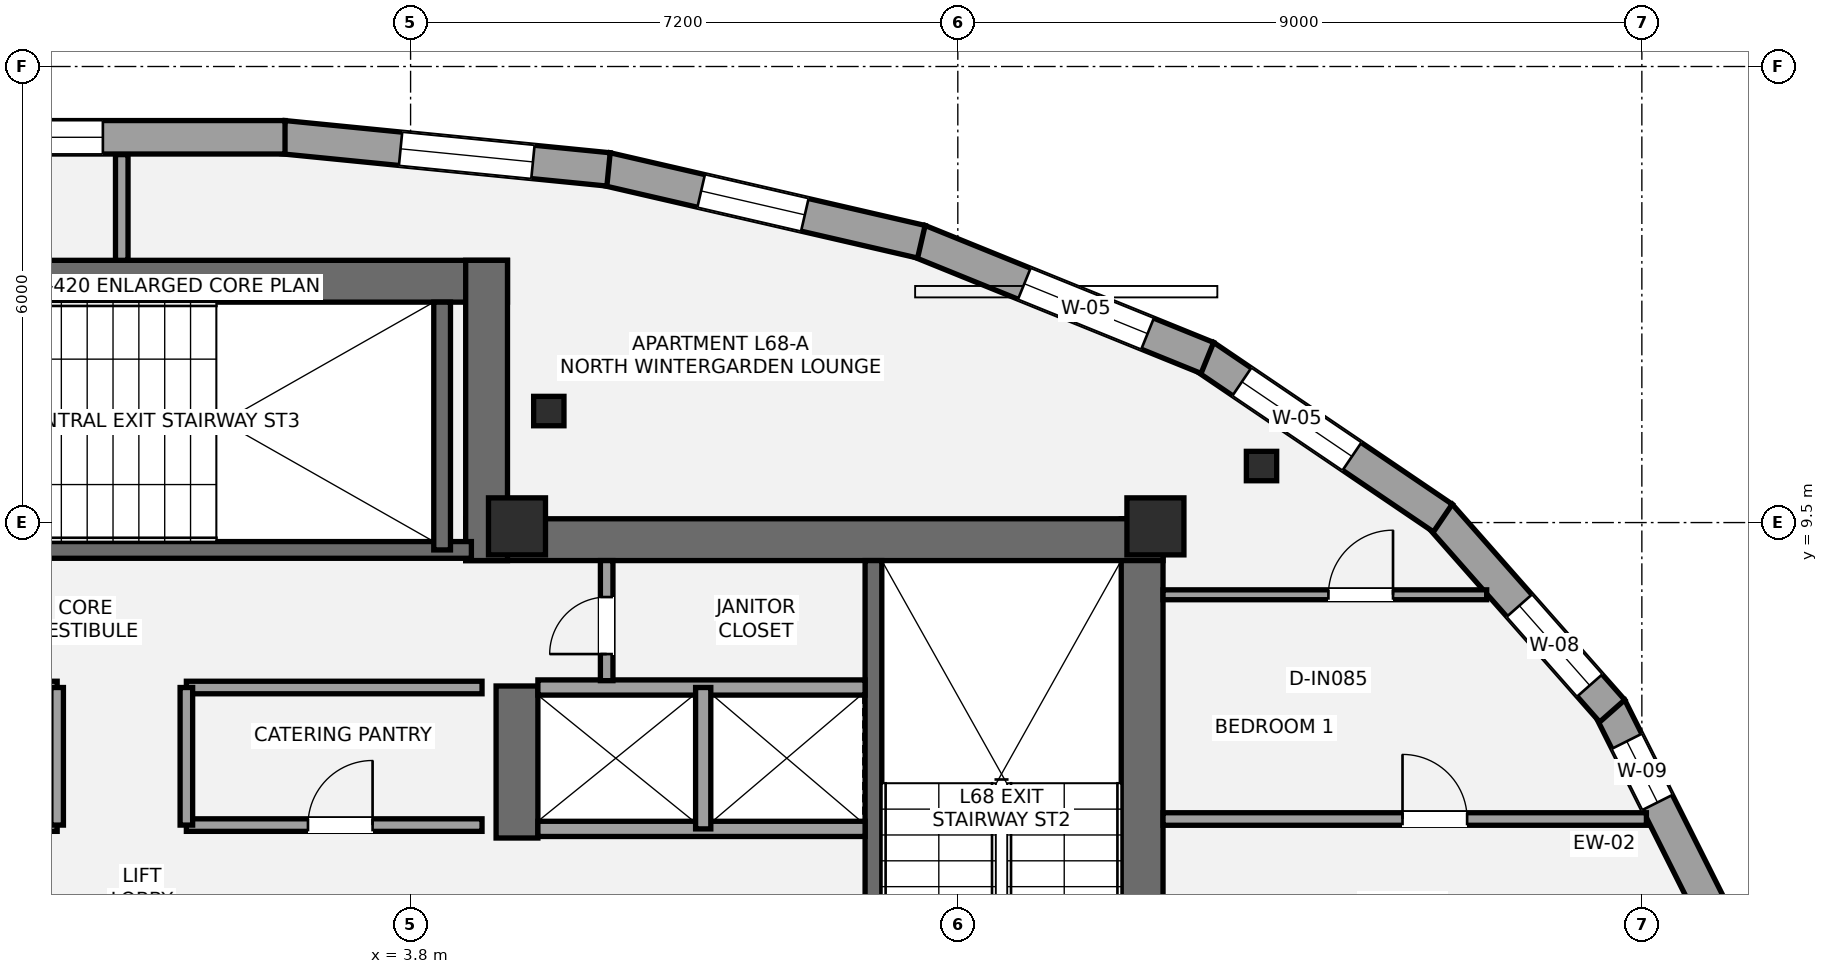
"""IFC4 building model, lengths in metres.
Left out: names, types, materials, properties, quantities, classifications, styles, units other than length and angle.
Written with IfcOpenShell. Run it as: python <this file> out.ifc"""

import sys

from ifc_helpers import new_model, si_unit, direction, frame, frame_2d, origin, origin_2d, place, context, subcontext, project, spatial, rectangle, i_section, extrude, element, fill, save


model = new_model("IFC4")
c1 = context("Model", 3, precision=1e-05, world=origin(), true_north=direction((0.0, 1.0)))
c2 = subcontext(c1, "Body", "Model", "MODEL_VIEW")
j1 = project(units=[si_unit("LENGTHUNIT", "METRE"), si_unit("PLANEANGLEUNIT", "RADIAN")], contexts=[c1])
p1 = place(None, origin())
s1 = spatial("IfcSite", under=j1, at=p1, CompositionType="ELEMENT")
p2 = place(p1, origin())
s2 = spatial("IfcBuilding", under=s1, at=p2, CompositionType="ELEMENT")
p3 = place(p2, frame((0.0, 0.0, 241.5)))
s3 = spatial("IfcBuildingStorey", under=s2, at=p3, CompositionType="ELEMENT", Elevation=241.5)
p4 = place(p3, frame((13.425, 1.3, 0.0), z_axis=(0.0, 0.0, 1.0), x_axis=(0.0, 1.0, 0.0)))
e1 = element("IfcWall", 1, at=p4, inside=s3, PredefinedType="SHEAR", context=c2, shape_type="SweptSolid", body=[
    extrude(rectangle(XDim=8.25, YDim=0.55, at=frame_2d((4.125, 0.0))), origin(), (0.0, 0.0, 1.0), 3.15),
])
p5 = place(p3, frame((4.525, 9.275, 0.0), z_axis=(0.0, 0.0, 1.0), x_axis=(1.0, 0.0, 0.0)))
e2 = element("IfcWall", 2, at=p5, inside=s3, PredefinedType="SHEAR", context=c2, shape_type="SweptSolid", body=[
    extrude(rectangle(XDim=9.175, YDim=0.55, at=frame_2d((4.587, 0.0))), origin(), (0.0, 0.0, 1.0), 3.15),
])
p6 = place(p3, frame((5.2, 5.35, 0.0), z_axis=(0.0, 0.0, 1.0), x_axis=(0.0, 1.0, 0.0)))
e3 = element("IfcWall", 3, at=p6, inside=s3, PredefinedType="SHEAR", context=c2, shape_type="SweptSolid", body=[
    extrude(rectangle(XDim=2.0, YDim=0.55, at=frame_2d((1.0, 0.0))), origin(), (0.0, 0.0, 1.0), 3.15),
])
p7 = place(p3, frame((9.89, 1.85, 0.0), z_axis=(0.0, 0.0, 1.0), x_axis=(0.0, 1.0, 0.0)))
e4 = element("IfcWall", 4, at=p7, inside=s3, PredefinedType="SHEAR", context=c2, shape_type="SweptSolid", body=[
    extrude(rectangle(XDim=7.15, YDim=0.22, at=frame_2d((3.575, 0.0))), origin(), (0.0, 0.0, 1.0), 3.15),
])
p8 = place(p3, frame((-5.075, 12.675, 0.0), z_axis=(0.0, 0.0, 1.0), x_axis=(1.0, 0.0, 0.0)))
e5 = element("IfcWall", 5, at=p8, inside=s3, PredefinedType="SHEAR", context=c2, shape_type="SweptSolid", body=[
    extrude(rectangle(XDim=10.15, YDim=0.55, at=frame_2d((5.075, 0.0))), origin(), (0.0, 0.0, 1.0), 3.15),
])
p9 = place(p3, frame((4.8, 9.0, 0.0), z_axis=(0.0, 0.0, 1.0), x_axis=(0.0, 1.0, 0.0)))
e6 = element("IfcWall", 6, at=p9, inside=s3, PredefinedType="SHEAR", context=c2, shape_type="SweptSolid", body=[
    extrude(rectangle(XDim=3.95, YDim=0.55, at=frame_2d((1.975, 0.0))), origin(), (0.0, 0.0, 1.0), 3.15),
])
p10 = place(p3, frame((-4.7, 9.14, 0.0), z_axis=(0.0, 0.0, 1.0), x_axis=(1.0, 0.0, 0.0)))
e7 = element("IfcWall", 7, at=p10, inside=s3, PredefinedType="SHEAR", context=c2, shape_type="SweptSolid", body=[
    extrude(rectangle(XDim=9.3, YDim=0.22, at=frame_2d((4.65, 0.0))), origin(), (0.0, 0.0, 1.0), 3.15),
])
p11 = place(p10, frame((1.15, 0.0, 0.0)))
e8 = element("IfcOpeningElement", 8, at=p11, cuts=e7, PredefinedType="OPENING", context=c2, shape_type="SweptSolid", body=[
    extrude(rectangle(XDim=1.05, YDim=2.15, at=frame_2d((0.525, 1.075))), frame((0.0, 0.12, 0.0), z_axis=(0.0, -1.0, 0.0), x_axis=(1.0, 0.0, 0.0)), (0.0, 0.0, 1.0), 0.24),
])
p12 = place(p3, frame((4.215, 9.14, 0.0), z_axis=(0.0, 0.0, 1.0), x_axis=(0.0, 1.0, 0.0)))
e9 = element("IfcWall", 9, at=p12, inside=s3, PredefinedType="SHEAR", context=c2, shape_type="SweptSolid", body=[
    extrude(rectangle(XDim=3.26, YDim=0.22, at=frame_2d((1.63, 0.0))), origin(), (0.0, 0.0, 1.0), 3.15),
])
for number, where, z_axis, x_axis in (
    (10, (5.2, 9.45, 0.0), (0.0, 0.0, 1.0), (1.0, 0.0, 0.0)),
    (11, (13.6, 9.45, 0.0), (0.0, 0.0, 1.0), (1.0, 0.0, 0.0)),
):
    element("IfcColumn", number, at=place(p3, frame(where, z_axis=z_axis, x_axis=x_axis)), inside=s3, PredefinedType="PILASTER", context=c2, shape_type="SweptSolid", body=[
        extrude(rectangle(XDim=0.75, YDim=0.75, at=origin_2d()), origin(), (0.0, 0.0, 1.0), 3.15),
    ])
for number, where, z_axis, x_axis in (
    (12, (14.996, 10.244, 0.0), (0.0, 0.0, 1.0), (1.0, 0.0, 0.0)),
    (13, (5.619, 10.967, 0.0), (0.0, 0.0, 1.0), (1.0, 0.0, 0.0)),
):
    element("IfcColumn", number, at=place(p3, frame(where, z_axis=z_axis, x_axis=x_axis)), inside=s3, PredefinedType="COLUMN", context=c2, shape_type="SweptSolid", body=[
        extrude(i_section(OverallWidth=0.399, OverallDepth=0.387, WebThickness=0.021, FlangeThickness=0.033, at=origin_2d()), origin(), (0.0, 0.0, 1.0), 3.15),
    ])
p13 = place(p3, frame((19.578, 7.069, 0.0), z_axis=(0.0, 0.0, 1.0), x_axis=(0.448424724145, -0.893820601002, 0.0)))
e14 = element("IfcWall", 14, at=p13, inside=s3, PredefinedType="STANDARD", context=c2, shape_type="SweptSolid", body=[
    extrude(rectangle(XDim=3.144, YDim=0.44, at=frame_2d((1.572, 0.0))), origin(), (0.0, 0.0, 1.0), 2.336),
])
p14 = place(p13, frame((0.499, 0.0, 0.58)))
e15 = element("IfcOpeningElement", 15, at=p14, cuts=e14, PredefinedType="OPENING", context=c2, shape_type="SweptSolid", body=[
    extrude(rectangle(XDim=0.9, YDim=1.35, at=frame_2d((0.45, 0.675))), frame((0.0, 0.23, 0.0), z_axis=(0.0, -1.0, 0.0), x_axis=(1.0, 0.0, 0.0)), (0.0, 0.0, 1.0), 0.46),
])
p15 = place(p3, frame((17.34, 9.596, 0.0), z_axis=(0.0, 0.0, 1.0), x_axis=(0.66136043846, -0.750068243855, 0.0)))
e16 = element("IfcWall", 16, at=p15, inside=s3, PredefinedType="STANDARD", context=c2, shape_type="SweptSolid", body=[
    extrude(rectangle(XDim=3.432, YDim=0.44, at=frame_2d((1.716, 0.0))), origin(), (0.0, 0.0, 1.0), 2.336),
])
p16 = place(p15, frame((1.585, 0.0, 0.58)))
e17 = element("IfcOpeningElement", 17, at=p16, cuts=e16, PredefinedType="OPENING", context=c2, shape_type="SweptSolid", body=[
    extrude(rectangle(XDim=1.4, YDim=1.55, at=frame_2d((0.7, 0.775))), frame((0.0, 0.23, 0.0), z_axis=(0.0, -1.0, 0.0), x_axis=(1.0, 0.0, 0.0)), (0.0, 0.0, 1.0), 0.46),
])
p17 = place(p3, frame((14.242, 11.688, 0.0), z_axis=(0.0, 0.0, 1.0), x_axis=(0.827637036896, -0.561263694851, 0.0)))
e18 = element("IfcWall", 18, at=p17, inside=s3, PredefinedType="STANDARD", context=c2, shape_type="SweptSolid", body=[
    extrude(rectangle(XDim=3.793, YDim=0.44, at=frame_2d((1.896, 0.0))), origin(), (0.0, 0.0, 1.0), 2.336),
])
p18 = place(p17, frame((0.598, 0.0, 0.55)))
e19 = element("IfcOpeningElement", 19, at=p18, cuts=e18, PredefinedType="OPENING", context=c2, shape_type="SweptSolid", body=[
    extrude(rectangle(XDim=1.75, YDim=1.55, at=frame_2d((0.875, 0.775))), frame((0.0, 0.23, 0.0), z_axis=(0.0, -1.0, 0.0), x_axis=(1.0, 0.0, 0.0)), (0.0, 0.0, 1.0), 0.46),
])
p19 = place(p3, frame((10.487, 13.205, 0.0), z_axis=(0.0, 0.0, 1.0), x_axis=(0.926731976866, -0.375723093586, 0.0)))
e20 = element("IfcWall", 20, at=p19, inside=s3, PredefinedType="STANDARD", context=c2, shape_type="SweptSolid", body=[
    extrude(rectangle(XDim=4.096, YDim=0.44, at=frame_2d((2.048, 0.0))), origin(), (0.0, 0.0, 1.0), 2.336),
])
p20 = place(p19, frame((1.498, 0.0, 0.55)))
e21 = element("IfcOpeningElement", 21, at=p20, cuts=e20, PredefinedType="OPENING", context=c2, shape_type="SweptSolid", body=[
    extrude(rectangle(XDim=1.75, YDim=1.55, at=frame_2d((0.875, 0.775))), frame((0.0, 0.23, 0.0), z_axis=(0.0, -1.0, 0.0), x_axis=(1.0, 0.0, 0.0)), (0.0, 0.0, 1.0), 0.46),
])
p21 = place(p3, frame((6.377, 14.151, 0.0), z_axis=(0.0, 0.0, 1.0), x_axis=(0.974398936081, -0.224825962391, 0.0)))
e22 = element("IfcWall", 22, at=p21, inside=s3, PredefinedType="STANDARD", context=c2, shape_type="SweptSolid", body=[
    extrude(rectangle(XDim=4.252, YDim=0.44, at=frame_2d((2.126, 0.0))), origin(), (0.0, 0.0, 1.0), 2.336),
])
p22 = place(p21, frame((1.279, 0.0, 0.55)))
e23 = element("IfcOpeningElement", 23, at=p22, cuts=e22, PredefinedType="OPENING", context=c2, shape_type="SweptSolid", body=[
    extrude(rectangle(XDim=1.4, YDim=1.55, at=frame_2d((0.7, 0.775))), frame((0.0, 0.23, 0.0), z_axis=(0.0, -1.0, 0.0), x_axis=(1.0, 0.0, 0.0)), (0.0, 0.0, 1.0), 0.46),
])
p23 = place(p3, frame((2.126, 14.57, 0.0), z_axis=(0.0, 0.0, 1.0), x_axis=(0.995134540264, -0.098525361068, 0.0)))
e24 = element("IfcWall", 24, at=p23, inside=s3, PredefinedType="STANDARD", context=c2, shape_type="SweptSolid", body=[
    extrude(rectangle(XDim=4.299, YDim=0.44, at=frame_2d((2.15, 0.0))), origin(), (0.0, 0.0, 1.0), 2.336),
])
p24 = place(p23, frame((1.55, 0.0, 0.55)))
e25 = element("IfcOpeningElement", 25, at=p24, cuts=e24, PredefinedType="OPENING", context=c2, shape_type="SweptSolid", body=[
    extrude(rectangle(XDim=1.75, YDim=1.55, at=frame_2d((0.875, 0.775))), frame((0.0, 0.23, 0.0), z_axis=(0.0, -1.0, 0.0), x_axis=(1.0, 0.0, 0.0)), (0.0, 0.0, 1.0), 0.46),
])
p25 = place(p3, frame((-2.148, 14.569, 0.0), z_axis=(0.0, 0.0, 1.0), x_axis=(1.0, 0.0, 0.0)))
e26 = element("IfcWall", 26, at=p25, inside=s3, PredefinedType="STANDARD", context=c2, shape_type="SweptSolid", body=[
    extrude(rectangle(XDim=4.296, YDim=0.44, at=frame_2d((2.148, 0.0))), origin(), (0.0, 0.0, 1.0), 2.336),
])
p26 = place(p25, frame((0.5, 0.0, 0.58)))
e27 = element("IfcOpeningElement", 27, at=p26, cuts=e26, PredefinedType="OPENING", context=c2, shape_type="SweptSolid", body=[
    extrude(rectangle(XDim=1.4, YDim=1.55, at=frame_2d((0.7, 0.775))), frame((0.0, 0.23, 0.0), z_axis=(0.0, -1.0, 0.0), x_axis=(1.0, 0.0, 0.0)), (0.0, 0.0, 1.0), 0.46),
])
for number, where, z_axis, x_axis in (
    (28, (5.475, 5.47, 0.0), (0.0, 0.0, 1.0), (1.0, 0.0, 0.0)),
    (29, (5.475, 7.33, 0.0), (0.0, 0.0, 1.0), (1.0, 0.0, 0.0)),
):
    element("IfcWall", number, at=place(p3, frame(where, z_axis=z_axis, x_axis=x_axis)), inside=s3, PredefinedType="SOLIDWALL", context=c2, shape_type="SweptSolid", body=[
        extrude(rectangle(XDim=4.305, YDim=0.2, at=frame_2d((2.152, 0.0))), origin(), (0.0, 0.0, 1.0), 2.97),
    ])
p27 = place(p3, frame((7.65, 5.47, 0.0), z_axis=(0.0, 0.0, 1.0), x_axis=(0.0, 1.0, 0.0)))
e30 = element("IfcWall", 30, at=p27, inside=s3, PredefinedType="SOLIDWALL", context=c2, shape_type="SweptSolid", body=[
    extrude(rectangle(XDim=1.86, YDim=0.2, at=frame_2d((0.93, 0.0))), origin(), (0.0, 0.0, 1.0), 2.97),
])
p28 = place(p3, frame((-4.74, 5.52, 0.0), z_axis=(0.0, 0.0, 1.0), x_axis=(1.0, 0.0, 0.0)))
e31 = element("IfcWall", 31, at=p28, inside=s3, PredefinedType="PARTITIONING", context=c2, shape_type="SweptSolid", body=[
    extrude(rectangle(XDim=3.89, YDim=0.165, at=frame_2d((1.945, 0.0))), origin(), (0.0, 0.0, 1.0), 2.97),
])
p29 = place(p28, frame((0.75, 0.0, 0.0)))
e32 = element("IfcOpeningElement", 32, at=p29, cuts=e31, PredefinedType="OPENING", context=c2, shape_type="SweptSolid", body=[
    extrude(rectangle(XDim=0.85, YDim=2.1, at=frame_2d((0.425, 1.05))), frame((0.0, 0.093, 0.0), z_axis=(0.0, -1.0, 0.0), x_axis=(1.0, 0.0, 0.0)), (0.0, 0.0, 1.0), 0.185),
])
p30 = place(p28, frame((2.84, 0.0, 0.0)))
e33 = element("IfcOpeningElement", 33, at=p30, cuts=e31, PredefinedType="OPENING", context=c2, shape_type="SweptSolid", body=[
    extrude(rectangle(XDim=0.75, YDim=2.1, at=frame_2d((0.375, 1.05))), frame((0.0, 0.093, 0.0), z_axis=(0.0, -1.0, 0.0), x_axis=(1.0, 0.0, 0.0)), (0.0, 0.0, 1.0), 0.185),
])
p31 = place(p3, frame((-4.74, 7.33, 0.0), z_axis=(0.0, 0.0, 1.0), x_axis=(1.0, 0.0, 0.0)))
e34 = element("IfcWall", 34, at=p31, inside=s3, PredefinedType="PARTITIONING", context=c2, shape_type="SweptSolid", body=[
    extrude(rectangle(XDim=3.89, YDim=0.165, at=frame_2d((1.945, 0.0))), origin(), (0.0, 0.0, 1.0), 2.97),
])
p32 = place(p3, frame((-0.85, 5.52, 0.0), z_axis=(0.0, 0.0, 1.0), x_axis=(0.0, 1.0, 0.0)))
e35 = element("IfcWall", 35, at=p32, inside=s3, PredefinedType="PARTITIONING", context=c2, shape_type="SweptSolid", body=[
    extrude(rectangle(XDim=1.81, YDim=0.165, at=frame_2d((0.905, 0.0))), origin(), (0.0, 0.0, 1.0), 2.97),
])
p33 = place(p3, frame((0.85, 5.52, 0.0), z_axis=(0.0, 0.0, 1.0), x_axis=(1.0, 0.0, 0.0)))
e36 = element("IfcWall", 36, at=p33, inside=s3, PredefinedType="PARTITIONING", context=c2, shape_type="SweptSolid", body=[
    extrude(rectangle(XDim=3.89, YDim=0.165, at=frame_2d((1.945, 0.0))), origin(), (0.0, 0.0, 1.0), 2.97),
])
p34 = place(p33, frame((1.6, 0.0, 0.0)))
e37 = element("IfcOpeningElement", 37, at=p34, cuts=e36, PredefinedType="OPENING", context=c2, shape_type="SweptSolid", body=[
    extrude(rectangle(XDim=0.85, YDim=2.1, at=frame_2d((0.425, 1.05))), frame((0.0, 0.093, 0.0), z_axis=(0.0, -1.0, 0.0), x_axis=(1.0, 0.0, 0.0)), (0.0, 0.0, 1.0), 0.185),
])
p35 = place(p3, frame((0.85, 7.33, 0.0), z_axis=(0.0, 0.0, 1.0), x_axis=(1.0, 0.0, 0.0)))
e38 = element("IfcWall", 38, at=p35, inside=s3, PredefinedType="PARTITIONING", context=c2, shape_type="SweptSolid", body=[
    extrude(rectangle(XDim=3.89, YDim=0.165, at=frame_2d((1.945, 0.0))), origin(), (0.0, 0.0, 1.0), 2.97),
])
p36 = place(p3, frame((0.85, 5.52, 0.0), z_axis=(0.0, 0.0, 1.0), x_axis=(0.0, 1.0, 0.0)))
e39 = element("IfcWall", 39, at=p36, inside=s3, PredefinedType="PARTITIONING", context=c2, shape_type="SweptSolid", body=[
    extrude(rectangle(XDim=1.81, YDim=0.165, at=frame_2d((0.905, 0.0))), origin(), (0.0, 0.0, 1.0), 2.97),
])
p37 = place(p3, frame((6.38, 7.42, 0.0), z_axis=(0.0, 0.0, 1.0), x_axis=(0.0, 1.0, 0.0)))
e40 = element("IfcWall", 40, at=p37, inside=s3, PredefinedType="PARTITIONING", context=c2, shape_type="SweptSolid", body=[
    extrude(rectangle(XDim=1.58, YDim=0.165, at=frame_2d((0.79, 0.0))), origin(), (0.0, 0.0, 1.0), 2.97),
])
p38 = place(p37, frame((0.35, 0.0, 0.0)))
e41 = element("IfcOpeningElement", 41, at=p38, cuts=e40, PredefinedType="OPENING", context=c2, shape_type="SweptSolid", body=[
    extrude(rectangle(XDim=0.75, YDim=2.1, at=frame_2d((0.375, 1.05))), frame((0.0, 0.093, 0.0), z_axis=(0.0, -1.0, 0.0), x_axis=(1.0, 0.0, 0.0)), (0.0, 0.0, 1.0), 0.185),
])
p39 = place(p3, frame((0.0, 12.95, 0.0), z_axis=(0.0, 0.0, 1.0), x_axis=(0.0, 1.0, 0.0)))
e42 = element("IfcWall", 42, at=p39, inside=s3, PredefinedType="PARTITIONING", context=c2, shape_type="SweptSolid", body=[
    extrude(rectangle(XDim=1.391, YDim=0.165, at=frame_2d((0.695, 0.0))), origin(), (0.0, 0.0, 1.0), 2.97),
])
p40 = place(p3, frame((13.7, 5.6, 0.0), z_axis=(0.0, 0.0, 1.0), x_axis=(1.0, 0.0, 0.0)))
e43 = element("IfcWall", 43, at=p40, inside=s3, PredefinedType="PARTITIONING", context=c2, shape_type="SweptSolid", body=[
    extrude(rectangle(XDim=6.36, YDim=0.165, at=frame_2d((3.18, 0.0))), origin(), (0.0, 0.0, 1.0), 2.423),
])
p41 = place(p40, frame((3.151, 0.0, 0.0)))
e44 = element("IfcOpeningElement", 44, at=p41, cuts=e43, PredefinedType="OPENING", context=c2, shape_type="SweptSolid", body=[
    extrude(rectangle(XDim=0.85, YDim=2.1, at=frame_2d((0.425, 1.05))), frame((0.0, 0.093, 0.0), z_axis=(0.0, -1.0, 0.0), x_axis=(1.0, 0.0, 0.0)), (0.0, 0.0, 1.0), 0.185),
])
p42 = place(p3, frame((13.7, 8.55, 0.0), z_axis=(0.0, 0.0, 1.0), x_axis=(1.0, 0.0, 0.0)))
e45 = element("IfcWall", 45, at=p42, inside=s3, PredefinedType="PARTITIONING", context=c2, shape_type="SweptSolid", body=[
    extrude(rectangle(XDim=4.258, YDim=0.13, at=frame_2d((2.129, 0.0))), origin(), (0.0, 0.0, 1.0), 2.423),
])
p43 = place(p42, frame((2.176, 0.0, 0.0)))
e46 = element("IfcOpeningElement", 46, at=p43, cuts=e45, PredefinedType="OPENING", context=c2, shape_type="SweptSolid", body=[
    extrude(rectangle(XDim=0.85, YDim=2.1, at=frame_2d((0.425, 1.05))), frame((0.0, 0.075, 0.0), z_axis=(0.0, -1.0, 0.0), x_axis=(1.0, 0.0, 0.0)), (0.0, 0.0, 1.0), 0.15),
])
p44 = place(p14, origin())
e47 = element("IfcWindow", 47, at=p44, inside=s3, PartitioningType="SINGLE_PANEL", PredefinedType="WINDOW", context=c2, shape_type="SweptSolid", body=[
    extrude(rectangle(XDim=0.9, YDim=1.35, at=frame_2d((0.45, 0.675))), frame((0.0, -0.01, 0.0), z_axis=(0.0, -1.0, 0.0), x_axis=(1.0, 0.0, 0.0)), (0.0, 0.0, 1.0), 0.06),
])
fill(e15, e47)
p45 = place(p16, origin())
e48 = element("IfcWindow", 48, at=p45, inside=s3, PartitioningType="SINGLE_PANEL", PredefinedType="WINDOW", context=c2, shape_type="SweptSolid", body=[
    extrude(rectangle(XDim=1.4, YDim=1.55, at=frame_2d((0.7, 0.775))), frame((0.0, -0.01, 0.0), z_axis=(0.0, -1.0, 0.0), x_axis=(1.0, 0.0, 0.0)), (0.0, 0.0, 1.0), 0.06),
])
fill(e17, e48)
p46 = place(p18, origin())
e49 = element("IfcWindow", 49, at=p46, inside=s3, PartitioningType="SINGLE_PANEL", PredefinedType="WINDOW", context=c2, shape_type="SweptSolid", body=[
    extrude(rectangle(XDim=1.75, YDim=1.55, at=frame_2d((0.875, 0.775))), frame((0.0, -0.01, 0.0), z_axis=(0.0, -1.0, 0.0), x_axis=(1.0, 0.0, 0.0)), (0.0, 0.0, 1.0), 0.06),
])
fill(e19, e49)
p47 = place(p20, origin())
e50 = element("IfcWindow", 50, at=p47, inside=s3, PartitioningType="SINGLE_PANEL", PredefinedType="WINDOW", context=c2, shape_type="SweptSolid", body=[
    extrude(rectangle(XDim=1.75, YDim=1.55, at=frame_2d((0.875, 0.775))), frame((0.0, -0.01, 0.0), z_axis=(0.0, -1.0, 0.0), x_axis=(1.0, 0.0, 0.0)), (0.0, 0.0, 1.0), 0.06),
])
fill(e21, e50)
p48 = place(p22, origin())
e51 = element("IfcWindow", 51, at=p48, inside=s3, PartitioningType="SINGLE_PANEL", PredefinedType="WINDOW", context=c2, shape_type="SweptSolid", body=[
    extrude(rectangle(XDim=1.4, YDim=1.55, at=frame_2d((0.7, 0.775))), frame((0.0, -0.01, 0.0), z_axis=(0.0, -1.0, 0.0), x_axis=(1.0, 0.0, 0.0)), (0.0, 0.0, 1.0), 0.06),
])
fill(e23, e51)
p49 = place(p24, origin())
e52 = element("IfcWindow", 52, at=p49, inside=s3, PartitioningType="SINGLE_PANEL", PredefinedType="WINDOW", context=c2, shape_type="SweptSolid", body=[
    extrude(rectangle(XDim=1.75, YDim=1.55, at=frame_2d((0.875, 0.775))), frame((0.0, -0.01, 0.0), z_axis=(0.0, -1.0, 0.0), x_axis=(1.0, 0.0, 0.0)), (0.0, 0.0, 1.0), 0.06),
])
fill(e25, e52)
p50 = place(p26, origin())
e53 = element("IfcWindow", 53, at=p50, inside=s3, PartitioningType="SINGLE_PANEL", PredefinedType="WINDOW", context=c2, shape_type="SweptSolid", body=[
    extrude(rectangle(XDim=1.4, YDim=1.55, at=frame_2d((0.7, 0.775))), frame((0.0, -0.01, 0.0), z_axis=(0.0, -1.0, 0.0), x_axis=(1.0, 0.0, 0.0)), (0.0, 0.0, 1.0), 0.06),
])
fill(e27, e53)
p51 = place(p34, origin())
e54 = element("IfcDoor", 54, at=p51, inside=s3, OperationType="SINGLE_SWING_RIGHT", PredefinedType="DOOR", context=c2, shape_type="SweptSolid", body=[
    extrude(rectangle(XDim=0.85, YDim=2.1, at=frame_2d((0.425, 1.05))), frame((0.0, 0.025, 0.0), z_axis=(0.0, -1.0, 0.0), x_axis=(1.0, 0.0, 0.0)), (0.0, 0.0, 1.0), 0.05),
])
fill(e37, e54)
p52 = place(p38, origin())
e55 = element("IfcDoor", 55, at=p52, inside=s3, OperationType="SINGLE_SWING_LEFT", PredefinedType="DOOR", context=c2, shape_type="SweptSolid", body=[
    extrude(rectangle(XDim=0.75, YDim=2.1, at=frame_2d((0.375, 1.05))), frame((0.0, 0.025, 0.0), z_axis=(0.0, -1.0, 0.0), x_axis=(1.0, 0.0, 0.0)), (0.0, 0.0, 1.0), 0.05),
])
fill(e41, e55)
p53 = place(p41, origin())
e56 = element("IfcDoor", 56, at=p53, inside=s3, OperationType="SINGLE_SWING_LEFT", PredefinedType="DOOR", context=c2, shape_type="SweptSolid", body=[
    extrude(rectangle(XDim=0.85, YDim=2.1, at=frame_2d((0.425, 1.05))), frame((0.0, 0.025, 0.0), z_axis=(0.0, -1.0, 0.0), x_axis=(1.0, 0.0, 0.0)), (0.0, 0.0, 1.0), 0.05),
])
fill(e44, e56)
p54 = place(p43, origin())
e57 = element("IfcDoor", 57, at=p54, inside=s3, OperationType="SINGLE_SWING_RIGHT", PredefinedType="DOOR", context=c2, shape_type="SweptSolid", body=[
    extrude(rectangle(XDim=0.85, YDim=2.1, at=frame_2d((0.425, 1.05))), frame((0.0, 0.025, 0.0), z_axis=(0.0, -1.0, 0.0), x_axis=(1.0, 0.0, 0.0)), (0.0, 0.0, 1.0), 0.05),
])
fill(e46, e57)
save(model, sys.argv[1])
